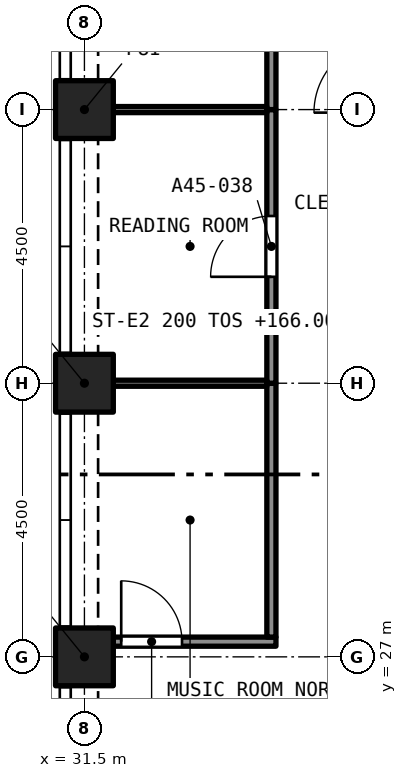
"""IFC4 building model, lengths in metres.
Left out: names, types, materials, properties, quantities, classifications, styles, units other than length and angle.
Written with IfcOpenShell. Run it as: python <this file> out.ifc"""

import sys

from ifc_helpers import new_model, si_unit, direction, frame, frame_2d, origin, origin_2d, place, context, subcontext, project, spatial, rectangle, extrude, element, fill, save


model = new_model("IFC4")
c1 = context("Model", 3, precision=1e-05, world=origin(), true_north=direction((0.0, 1.0)))
c2 = subcontext(c1, "Body", "Model", "MODEL_VIEW")
j1 = project(units=[si_unit("LENGTHUNIT", "METRE"), si_unit("PLANEANGLEUNIT", "RADIAN")], contexts=[c1])
p1 = place(None, origin())
s1 = spatial("IfcSite", under=j1, at=p1, CompositionType="ELEMENT")
p2 = place(p1, origin())
s2 = spatial("IfcBuilding", under=s1, at=p2, CompositionType="ELEMENT")
p3 = place(p2, frame((0.0, 0.0, 163.8)))
s3 = spatial("IfcBuildingStorey", under=s2, at=p3, CompositionType="ELEMENT", Elevation=163.8)
for number, where, z_axis, x_axis in (
    (1, (31.5, 27.0, 0.0), (0.0, 0.0, 1.0), (1.0, 0.0, 0.0)),
    (2, (31.5, 31.5, 0.0), (0.0, 0.0, 1.0), (1.0, 0.0, 0.0)),
    (3, (31.5, 36.0, 0.0), (0.0, 0.0, 1.0), (1.0, 0.0, 0.0)),
):
    element("IfcColumn", number, at=place(p3, frame(where, z_axis=z_axis, x_axis=x_axis)), inside=s3, PredefinedType="COLUMN", context=c2, shape_type="SweptSolid", body=[
        extrude(rectangle(XDim=0.95, YDim=0.95, at=origin_2d()), origin(), (0.0, 0.0, 1.0), 4.4),
    ])
p4 = place(p3, frame((31.975, 27.25, 0.0), z_axis=(0.0, 0.0, 1.0), x_axis=(1.0, 0.0, 0.0)))
e4 = element("IfcWall", 4, at=p4, inside=s3, PredefinedType="PARTITIONING", context=c2, shape_type="SweptSolid", body=[
    extrude(rectangle(XDim=2.675, YDim=0.15, at=frame_2d((1.337, 0.0))), origin(), (0.0, 0.0, 1.0), 4.1),
])
p5 = place(p4, frame((0.13, 0.0, 0.0)))
e5 = element("IfcOpeningElement", 5, at=p5, cuts=e4, PredefinedType="OPENING", context=c2, shape_type="SweptSolid", body=[
    extrude(rectangle(XDim=1.0, YDim=2.1, at=frame_2d((0.5, 1.05))), frame((0.0, 0.085, 0.0), z_axis=(0.0, -1.0, 0.0), x_axis=(1.0, 0.0, 0.0)), (0.0, 0.0, 1.0), 0.17),
])
p6 = place(p3, frame((34.575, 27.325, 0.0), z_axis=(0.0, 0.0, 1.0), x_axis=(0.0, 1.0, 0.0)))
e6 = element("IfcWall", 6, at=p6, inside=s3, PredefinedType="PARTITIONING", context=c2, shape_type="SweptSolid", body=[
    extrude(rectangle(XDim=4.175, YDim=0.15, at=frame_2d((2.087, 0.0))), origin(), (0.0, 0.0, 1.0), 4.1),
])
p7 = place(p3, frame((34.575, 31.5, 0.0), z_axis=(0.0, 0.0, 1.0), x_axis=(0.0, 1.0, 0.0)))
e7 = element("IfcWall", 7, at=p7, inside=s3, PredefinedType="PARTITIONING", context=c2, shape_type="SweptSolid", body=[
    extrude(rectangle(XDim=4.5, YDim=0.15, at=frame_2d((2.25, 0.0))), origin(), (0.0, 0.0, 1.0), 4.1),
])
p8 = place(p7, frame((1.75, 0.0, 0.0)))
e8 = element("IfcOpeningElement", 8, at=p8, cuts=e7, PredefinedType="OPENING", context=c2, shape_type="SweptSolid", body=[
    extrude(rectangle(XDim=1.0, YDim=2.1, at=frame_2d((0.5, 1.05))), frame((0.0, 0.085, 0.0), z_axis=(0.0, -1.0, 0.0), x_axis=(1.0, 0.0, 0.0)), (0.0, 0.0, 1.0), 0.17),
])
p9 = place(p3, frame((34.575, 36.0, 0.0), z_axis=(0.0, 0.0, 1.0), x_axis=(0.0, 1.0, 0.0)))
e9 = element("IfcWall", 9, at=p9, inside=s3, PredefinedType="PARTITIONING", context=c2, shape_type="SweptSolid", body=[
    extrude(rectangle(XDim=4.125, YDim=0.15, at=frame_2d((2.062, 0.0))), origin(), (0.0, 0.0, 1.0), 4.1),
])
p10 = place(p9, frame((1.625, 0.0, 0.0)))
e10 = element("IfcOpeningElement", 10, at=p10, cuts=e9, PredefinedType="OPENING", context=c2, shape_type="SweptSolid", body=[
    extrude(rectangle(XDim=1.0, YDim=2.1, at=frame_2d((0.5, 1.05))), frame((0.0, 0.085, 0.0), z_axis=(0.0, -1.0, 0.0), x_axis=(1.0, 0.0, 0.0)), (0.0, 0.0, 1.0), 0.17),
])
for number, where, z_axis, x_axis in (
    (11, (31.975, 31.5, 0.0), (0.0, 0.0, 1.0), (1.0, 0.0, 0.0)),
    (12, (31.975, 36.0, 0.0), (0.0, 0.0, 1.0), (1.0, 0.0, 0.0)),
):
    element("IfcWall", number, at=place(p3, frame(where, z_axis=z_axis, x_axis=x_axis)), inside=s3, PredefinedType="PARTITIONING", context=c2, shape_type="SweptSolid", body=[
        extrude(rectangle(XDim=2.525, YDim=0.1, at=frame_2d((1.262, 0.0))), origin(), (0.0, 0.0, 1.0), 4.1),
    ])
p11 = place(p5, origin())
e13 = element("IfcDoor", 13, at=p11, inside=s3, OperationType="SINGLE_SWING_LEFT", PredefinedType="DOOR", context=c2, shape_type="SweptSolid", body=[
    extrude(rectangle(XDim=1.0, YDim=2.1, at=frame_2d((0.5, 1.05))), frame((0.0, 0.025, 0.0), z_axis=(0.0, -1.0, 0.0), x_axis=(1.0, 0.0, 0.0)), (0.0, 0.0, 1.0), 0.05),
])
fill(e5, e13)
p12 = place(p8, origin())
e14 = element("IfcDoor", 14, at=p12, inside=s3, OperationType="SINGLE_SWING_RIGHT", PredefinedType="DOOR", context=c2, shape_type="SweptSolid", body=[
    extrude(rectangle(XDim=1.0, YDim=2.1, at=frame_2d((0.5, 1.05))), frame((0.0, 0.025, 0.0), z_axis=(0.0, -1.0, 0.0), x_axis=(1.0, 0.0, 0.0)), (0.0, 0.0, 1.0), 0.05),
])
fill(e8, e14)
save(model, sys.argv[1])
